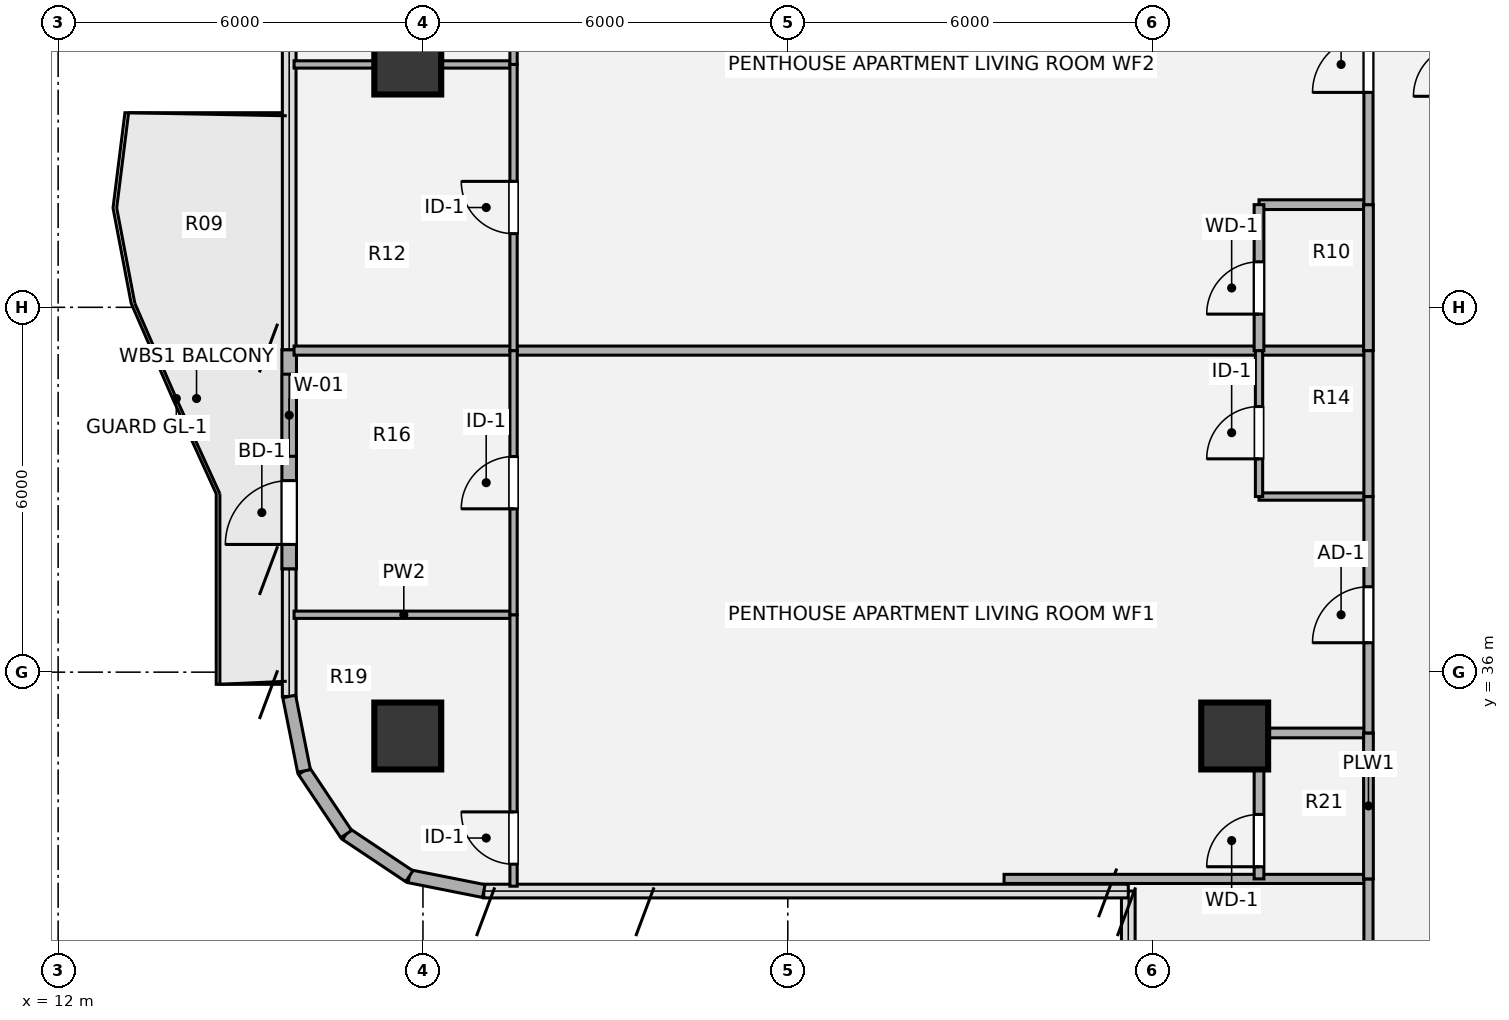
"""IFC4 building model, lengths in metres.
Left out: names, types, materials, properties, quantities, classifications, styles, units other than length and angle.
Written with IfcOpenShell. Run it as: python <this file> out.ifc"""

import sys

from ifc_helpers import new_model, si_unit, direction, frame, frame_2d, origin, origin_2d, place, context, subcontext, project, spatial, rectangle, hollow_circle, extrude, source, transform, mapped, element, fill, save


model = new_model("IFC4")
c1 = context("Model", 3, precision=1e-05, world=origin(), true_north=direction((0.0, 1.0)))
c2 = subcontext(c1, "Body", "Model", "MODEL_VIEW")
j1 = project(units=[si_unit("LENGTHUNIT", "METRE"), si_unit("PLANEANGLEUNIT", "RADIAN")], contexts=[c1])
p1 = place(None, origin())
s1 = spatial("IfcSite", under=j1, at=p1, CompositionType="ELEMENT")
p2 = place(p1, origin())
s2 = spatial("IfcBuilding", under=s1, at=p2, CompositionType="ELEMENT")
p3 = place(p2, frame((0.0, 0.0, 163.98)))
s3 = spatial("IfcBuildingStorey", under=s2, at=p3, CompositionType="ELEMENT", Elevation=163.98)
m1 = source(origin(), c2, "Body", "SweptSolid", [
    extrude(hollow_circle(Radius=0.55, WallThickness=0.04, at=origin_2d()), origin(), (0.0, 0.0, 1.0), 3.78),
])
for number, where, z_axis, x_axis in (
    (1, (17.75, 34.95, 0.0), (0.0, 0.0, 1.0), (1.0, 0.0, 0.0)),
    (2, (17.75, 46.05, 0.0), (0.0, 0.0, 1.0), (1.0, 0.0, 0.0)),
    (3, (31.35, 34.95, 0.0), (0.0, 0.0, 1.0), (1.0, 0.0, 0.0)),
):
    element("IfcColumn", number, at=place(p3, frame(where, z_axis=z_axis, x_axis=x_axis)), inside=s3, PredefinedType="COLUMN", context=c2, shape_type="MappedRepresentation", body=[
        mapped(m1, transform((0.0, 0.0, 0.0), x_axis=(1.0, 0.0, 0.0), y_axis=(0.0, 1.0, 0.0), z_axis=(0.0, 0.0, 1.0), scale=1.0)),
    ])
for number, where, z_axis, x_axis in (
    (4, (19.0, 32.4, 0.0), (0.0, 0.0, 1.0), (-0.981, 0.195, 0.0)),
    (5, (17.775, 32.644, 0.0), (0.0, 0.0, 1.0), (-0.831, 0.556, 0.0)),
    (6, (16.737, 33.337, 0.0), (0.0, 0.0, 1.0), (-0.556, 0.831, 0.0)),
    (7, (16.044, 34.375, 0.0), (0.0, 0.0, 1.0), (-0.195, 0.981, 0.0)),
):
    element("IfcWall", number, at=place(p3, frame(where, z_axis=z_axis, x_axis=x_axis)), inside=s3, PredefinedType="SOLIDWALL", context=c2, shape_type="SweptSolid", body=[
        extrude(rectangle(XDim=1.249, YDim=0.215, at=frame_2d((0.624, 0.0))), origin(), (0.0, 0.0, 1.0), 3.53),
    ])
p4 = place(p3, frame((15.8, 37.7, 0.0), z_axis=(0.0, 0.0, 1.0), x_axis=(0.0, 1.0, 0.0)))
e8 = element("IfcWall", 8, at=p4, inside=s3, PredefinedType="SOLIDWALL", context=c2, shape_type="SweptSolid", body=[
    extrude(rectangle(XDim=3.6, YDim=0.24, at=frame_2d((1.8, 0.0))), origin(), (0.0, 0.0, 1.0), 3.53),
])
p5 = place(p4, frame((0.4, 0.0, 0.0)))
e9 = element("IfcOpeningElement", 9, at=p5, cuts=e8, PredefinedType="OPENING", context=c2, shape_type="SweptSolid", body=[
    extrude(rectangle(XDim=1.05, YDim=2.15, at=origin_2d()), frame((0.525, 0.13, 1.075), z_axis=(0.0, -1.0, 0.0), x_axis=(1.0, 0.0, 0.0)), (0.0, 0.0, 1.0), 0.26),
])
p6 = place(p4, frame((1.85, 0.0, 0.85)))
e10 = element("IfcOpeningElement", 10, at=p6, cuts=e8, PredefinedType="OPENING", context=c2, shape_type="SweptSolid", body=[
    extrude(rectangle(XDim=1.35, YDim=1.35, at=origin_2d()), frame((0.675, 0.13, 0.675), z_axis=(0.0, -1.0, 0.0), x_axis=(1.0, 0.0, 0.0)), (0.0, 0.0, 1.0), 0.26),
])
p7 = place(p3, frame((27.557, 32.6, 0.0), z_axis=(0.0, 0.0, 1.0), x_axis=(1.0, 0.0, 0.0)))
e11 = element("IfcWall", 11, at=p7, inside=s3, PredefinedType="PARTITIONING", context=c2, shape_type="SweptSolid", body=[
    extrude(rectangle(XDim=5.993, YDim=0.15, at=frame_2d((2.997, 0.0))), origin(), (0.0, 0.0, 1.0), 3.5),
])
p8 = place(p3, frame((31.75, 35.0, 0.0), z_axis=(0.0, 0.0, 1.0), x_axis=(1.0, 0.0, 0.0)))
e12 = element("IfcWall", 12, at=p8, inside=s3, PredefinedType="PLUMBINGWALL", context=c2, shape_type="SweptSolid", body=[
    extrude(rectangle(XDim=1.8, YDim=0.16, at=frame_2d((0.9, 0.0))), origin(), (0.0, 0.0, 1.0), 2.903),
])
p9 = place(p3, frame((15.88, 36.944, 0.0), z_axis=(0.0, 0.0, 1.0), x_axis=(1.0, 0.0, 0.0)))
e13 = element("IfcWall", 13, at=p9, inside=s3, PredefinedType="PARTITIONING", context=c2, shape_type="SweptSolid", body=[
    extrude(rectangle(XDim=3.61, YDim=0.12, at=frame_2d((1.805, 0.0))), origin(), (0.0, 0.0, 1.0), 2.982),
])
p10 = place(p3, frame((31.75, 38.888, 0.0), z_axis=(0.0, 0.0, 1.0), x_axis=(1.0, 0.0, 0.0)))
e14 = element("IfcWall", 14, at=p10, inside=s3, PredefinedType="PARTITIONING", context=c2, shape_type="SweptSolid", body=[
    extrude(rectangle(XDim=1.8, YDim=0.12, at=frame_2d((0.9, 0.0))), origin(), (0.0, 0.0, 1.0), 3.259),
])
p11 = place(p3, frame((15.88, 41.288, 0.0), z_axis=(0.0, 0.0, 1.0), x_axis=(1.0, 0.0, 0.0)))
e15 = element("IfcWall", 15, at=p11, inside=s3, PredefinedType="PARTITIONING", context=c2, shape_type="SweptSolid", body=[
    extrude(rectangle(XDim=17.67, YDim=0.15, at=frame_2d((8.835, 0.0))), origin(), (0.0, 0.0, 1.0), 2.982),
])
p12 = place(p3, frame((31.75, 43.688, 0.0), z_axis=(0.0, 0.0, 1.0), x_axis=(1.0, 0.0, 0.0)))
e16 = element("IfcWall", 16, at=p12, inside=s3, PredefinedType="PLUMBINGWALL", context=c2, shape_type="SweptSolid", body=[
    extrude(rectangle(XDim=1.8, YDim=0.16, at=frame_2d((0.9, 0.0))), origin(), (0.0, 0.0, 1.0), 3.259),
])
p13 = place(p3, frame((15.88, 45.994, 0.0), z_axis=(0.0, 0.0, 1.0), x_axis=(1.0, 0.0, 0.0)))
e17 = element("IfcWall", 17, at=p13, inside=s3, PredefinedType="PARTITIONING", context=c2, shape_type="SweptSolid", body=[
    extrude(rectangle(XDim=3.61, YDim=0.12, at=frame_2d((1.805, 0.0))), origin(), (0.0, 0.0, 1.0), 2.903),
])
p14 = place(p3, frame((19.49, 32.48, 0.0), z_axis=(0.0, 0.0, 1.0), x_axis=(0.0, 1.0, 0.0)))
e18 = element("IfcWall", 18, at=p14, inside=s3, PredefinedType="PARTITIONING", context=c2, shape_type="SweptSolid", body=[
    extrude(rectangle(XDim=4.464, YDim=0.12, at=frame_2d((2.232, 0.0))), origin(), (0.0, 0.0, 1.0), 3.5),
])
p15 = place(p14, frame((0.362, 0.0, 0.0)))
e19 = element("IfcOpeningElement", 19, at=p15, cuts=e18, PredefinedType="OPENING", context=c2, shape_type="SweptSolid", body=[
    extrude(rectangle(XDim=0.86, YDim=2.1, at=origin_2d()), frame((0.43, 0.07, 1.05), z_axis=(0.0, -1.0, 0.0), x_axis=(1.0, 0.0, 0.0)), (0.0, 0.0, 1.0), 0.14),
])
p16 = place(p3, frame((19.49, 36.944, 0.0), z_axis=(0.0, 0.0, 1.0), x_axis=(0.0, 1.0, 0.0)))
e20 = element("IfcWall", 20, at=p16, inside=s3, PredefinedType="PARTITIONING", context=c2, shape_type="SweptSolid", body=[
    extrude(rectangle(XDim=4.344, YDim=0.12, at=frame_2d((2.172, 0.0))), origin(), (0.0, 0.0, 1.0), 3.5),
])
p17 = place(p16, frame((1.742, 0.0, 0.0)))
e21 = element("IfcOpeningElement", 21, at=p17, cuts=e20, PredefinedType="OPENING", context=c2, shape_type="SweptSolid", body=[
    extrude(rectangle(XDim=0.86, YDim=2.1, at=origin_2d()), frame((0.43, 0.07, 1.05), z_axis=(0.0, -1.0, 0.0), x_axis=(1.0, 0.0, 0.0)), (0.0, 0.0, 1.0), 0.14),
])
p18 = place(p3, frame((19.49, 41.288, 0.0), z_axis=(0.0, 0.0, 1.0), x_axis=(0.0, 1.0, 0.0)))
e22 = element("IfcWall", 22, at=p18, inside=s3, PredefinedType="PARTITIONING", context=c2, shape_type="SweptSolid", body=[
    extrude(rectangle(XDim=4.706, YDim=0.12, at=frame_2d((2.353, 0.0))), origin(), (0.0, 0.0, 1.0), 3.5),
])
p19 = place(p18, frame((1.923, 0.0, 0.0)))
e23 = element("IfcOpeningElement", 23, at=p19, cuts=e22, PredefinedType="OPENING", context=c2, shape_type="SweptSolid", body=[
    extrude(rectangle(XDim=0.86, YDim=2.1, at=origin_2d()), frame((0.43, 0.07, 1.05), z_axis=(0.0, -1.0, 0.0), x_axis=(1.0, 0.0, 0.0)), (0.0, 0.0, 1.0), 0.14),
])
p20 = place(p3, frame((19.49, 45.994, 0.0), z_axis=(0.0, 0.0, 1.0), x_axis=(0.0, 1.0, 0.0)))
e24 = element("IfcWall", 24, at=p20, inside=s3, PredefinedType="PARTITIONING", context=c2, shape_type="SweptSolid", body=[
    extrude(rectangle(XDim=4.706, YDim=0.12, at=frame_2d((2.353, 0.0))), origin(), (0.0, 0.0, 1.0), 3.5),
])
p21 = place(p20, frame((1.923, 0.0, 0.0)))
e25 = element("IfcOpeningElement", 25, at=p21, cuts=e24, PredefinedType="OPENING", context=c2, shape_type="SweptSolid", body=[
    extrude(rectangle(XDim=0.86, YDim=2.1, at=origin_2d()), frame((0.43, 0.07, 1.05), z_axis=(0.0, -1.0, 0.0), x_axis=(1.0, 0.0, 0.0)), (0.0, 0.0, 1.0), 0.14),
])
p22 = place(p3, frame((31.75, 32.6, 0.0), z_axis=(0.0, 0.0, 1.0), x_axis=(0.0, 1.0, 0.0)))
e26 = element("IfcWall", 26, at=p22, inside=s3, PredefinedType="PLUMBINGWALL", context=c2, shape_type="SweptSolid", body=[
    extrude(rectangle(XDim=2.4, YDim=0.16, at=frame_2d((1.2, 0.0))), origin(), (0.0, 0.0, 1.0), 3.5),
])
p23 = place(p22, frame((0.2, 0.0, 0.0)))
e27 = element("IfcOpeningElement", 27, at=p23, cuts=e26, PredefinedType="OPENING", context=c2, shape_type="SweptSolid", body=[
    extrude(rectangle(XDim=0.86, YDim=2.1, at=origin_2d()), frame((0.43, 0.09, 1.05), z_axis=(0.0, -1.0, 0.0), x_axis=(1.0, 0.0, 0.0)), (0.0, 0.0, 1.0), 0.18),
])
p24 = place(p3, frame((31.75, 38.888, 0.0), z_axis=(0.0, 0.0, 1.0), x_axis=(0.0, 1.0, 0.0)))
e28 = element("IfcWall", 28, at=p24, inside=s3, PredefinedType="PARTITIONING", context=c2, shape_type="SweptSolid", body=[
    extrude(rectangle(XDim=2.4, YDim=0.12, at=frame_2d((1.2, 0.0))), origin(), (0.0, 0.0, 1.0), 3.5),
])
p25 = place(p24, frame((0.62, 0.0, 0.0)))
e29 = element("IfcOpeningElement", 29, at=p25, cuts=e28, PredefinedType="OPENING", context=c2, shape_type="SweptSolid", body=[
    extrude(rectangle(XDim=0.86, YDim=2.1, at=origin_2d()), frame((0.43, 0.07, 1.05), z_axis=(0.0, -1.0, 0.0), x_axis=(1.0, 0.0, 0.0)), (0.0, 0.0, 1.0), 0.14),
])
p26 = place(p3, frame((31.75, 41.288, 0.0), z_axis=(0.0, 0.0, 1.0), x_axis=(0.0, 1.0, 0.0)))
e30 = element("IfcWall", 30, at=p26, inside=s3, PredefinedType="PLUMBINGWALL", context=c2, shape_type="SweptSolid", body=[
    extrude(rectangle(XDim=2.4, YDim=0.16, at=frame_2d((1.2, 0.0))), origin(), (0.0, 0.0, 1.0), 3.5),
])
p27 = place(p26, frame((0.6, 0.0, 0.0)))
e31 = element("IfcOpeningElement", 31, at=p27, cuts=e30, PredefinedType="OPENING", context=c2, shape_type="SweptSolid", body=[
    extrude(rectangle(XDim=0.86, YDim=2.1, at=origin_2d()), frame((0.43, 0.09, 1.05), z_axis=(0.0, -1.0, 0.0), x_axis=(1.0, 0.0, 0.0)), (0.0, 0.0, 1.0), 0.18),
])
p28 = place(p3, frame((33.55, 21.2, 0.0), z_axis=(0.0, 0.0, 1.0), x_axis=(0.0, 1.0, 0.0)))
e32 = element("IfcWall", 32, at=p28, inside=s3, PredefinedType="PARTITIONING", context=c2, shape_type="SweptSolid", body=[
    extrude(rectangle(XDim=11.4, YDim=0.15, at=frame_2d((5.7, 0.0))), origin(), (0.0, 0.0, 1.0), 3.5),
])
p29 = place(p28, frame((5.14, 0.0, 0.0)))
e33 = element("IfcOpeningElement", 33, at=p29, cuts=e32, PredefinedType="OPENING", context=c2, shape_type="SweptSolid", body=[
    extrude(rectangle(XDim=0.86, YDim=2.1, at=origin_2d()), frame((0.43, 0.085, 1.05), z_axis=(0.0, -1.0, 0.0), x_axis=(1.0, 0.0, 0.0)), (0.0, 0.0, 1.0), 0.17),
])
p30 = place(p3, frame((33.55, 32.6, 0.0), z_axis=(0.0, 0.0, 1.0), x_axis=(0.0, 1.0, 0.0)))
e34 = element("IfcWall", 34, at=p30, inside=s3, PredefinedType="PLUMBINGWALL", context=c2, shape_type="SweptSolid", body=[
    extrude(rectangle(XDim=2.4, YDim=0.16, at=frame_2d((1.2, 0.0))), origin(), (0.0, 0.0, 1.0), 3.5),
])
p31 = place(p3, frame((33.55, 35.0, 0.0), z_axis=(0.0, 0.0, 1.0), x_axis=(0.0, 1.0, 0.0)))
e35 = element("IfcWall", 35, at=p31, inside=s3, PredefinedType="PARTITIONING", context=c2, shape_type="SweptSolid", body=[
    extrude(rectangle(XDim=3.888, YDim=0.15, at=frame_2d((1.944, 0.0))), origin(), (0.0, 0.0, 1.0), 3.5),
])
p32 = place(p31, frame((1.484, 0.0, 0.0)))
e36 = element("IfcOpeningElement", 36, at=p32, cuts=e35, PredefinedType="OPENING", context=c2, shape_type="SweptSolid", body=[
    extrude(rectangle(XDim=0.92, YDim=2.1, at=origin_2d()), frame((0.46, 0.085, 1.05), z_axis=(0.0, -1.0, 0.0), x_axis=(1.0, 0.0, 0.0)), (0.0, 0.0, 1.0), 0.17),
])
p33 = place(p3, frame((33.55, 38.888, 0.0), z_axis=(0.0, 0.0, 1.0), x_axis=(0.0, 1.0, 0.0)))
e37 = element("IfcWall", 37, at=p33, inside=s3, PredefinedType="PARTITIONING", context=c2, shape_type="SweptSolid", body=[
    extrude(rectangle(XDim=2.4, YDim=0.15, at=frame_2d((1.2, 0.0))), origin(), (0.0, 0.0, 1.0), 3.5),
])
p34 = place(p3, frame((33.55, 41.288, 0.0), z_axis=(0.0, 0.0, 1.0), x_axis=(0.0, 1.0, 0.0)))
e38 = element("IfcWall", 38, at=p34, inside=s3, PredefinedType="PLUMBINGWALL", context=c2, shape_type="SweptSolid", body=[
    extrude(rectangle(XDim=2.4, YDim=0.16, at=frame_2d((1.2, 0.0))), origin(), (0.0, 0.0, 1.0), 3.5),
])
p35 = place(p3, frame((33.55, 43.688, 0.0), z_axis=(0.0, 0.0, 1.0), x_axis=(0.0, 1.0, 0.0)))
e39 = element("IfcWall", 39, at=p35, inside=s3, PredefinedType="PARTITIONING", context=c2, shape_type="SweptSolid", body=[
    extrude(rectangle(XDim=4.612, YDim=0.15, at=frame_2d((2.306, 0.0))), origin(), (0.0, 0.0, 1.0), 3.5),
])
p36 = place(p35, frame((1.846, 0.0, 0.0)))
e40 = element("IfcOpeningElement", 40, at=p36, cuts=e39, PredefinedType="OPENING", context=c2, shape_type="SweptSolid", body=[
    extrude(rectangle(XDim=0.92, YDim=2.1, at=origin_2d()), frame((0.46, 0.085, 1.05), z_axis=(0.0, -1.0, 0.0), x_axis=(1.0, 0.0, 0.0)), (0.0, 0.0, 1.0), 0.17),
])
m2 = source(origin(), c2, "Body", "SweptSolid", [
    extrude(rectangle(XDim=1.05, YDim=2.15, at=origin_2d()), frame((0.525, 0.025, 1.075), z_axis=(0.0, -1.0, 0.0), x_axis=(1.0, 0.0, 0.0)), (0.0, 0.0, 1.0), 0.05),
])
p37 = place(p5, origin())
e41 = element("IfcDoor", 41, at=p37, inside=s3, OperationType="SINGLE_SWING_LEFT", PredefinedType="DOOR", context=c2, shape_type="MappedRepresentation", body=[
    mapped(m2, transform((0.0, 0.0, 0.0), x_axis=(1.0, 0.0, 0.0), y_axis=(0.0, 1.0, 0.0), z_axis=(0.0, 0.0, 1.0), scale=1.0)),
])
fill(e9, e41)
m3 = source(origin(), c2, "Body", "SweptSolid", [
    extrude(rectangle(XDim=1.35, YDim=1.35, at=origin_2d()), frame((0.675, 0.03, 0.675), z_axis=(0.0, -1.0, 0.0), x_axis=(1.0, 0.0, 0.0)), (0.0, 0.0, 1.0), 0.06),
])
p38 = place(p6, origin())
e42 = element("IfcWindow", 42, at=p38, inside=s3, PartitioningType="SINGLE_PANEL", PredefinedType="WINDOW", context=c2, shape_type="MappedRepresentation", body=[
    mapped(m3, transform((0.0, 0.0, 0.0), x_axis=(1.0, 0.0, 0.0), y_axis=(0.0, 1.0, 0.0), z_axis=(0.0, 0.0, 1.0), scale=1.0)),
])
fill(e10, e42)
m4 = source(origin(), c2, "Body", "SweptSolid", [
    extrude(rectangle(XDim=0.86, YDim=2.1, at=origin_2d()), frame((0.43, 0.025, 1.05), z_axis=(0.0, -1.0, 0.0), x_axis=(1.0, 0.0, 0.0)), (0.0, 0.0, 1.0), 0.05),
])
p39 = place(p15, origin())
e43 = element("IfcDoor", 43, at=p39, inside=s3, OperationType="SINGLE_SWING_RIGHT", PredefinedType="DOOR", context=c2, shape_type="MappedRepresentation", body=[
    mapped(m4, transform((0.0, 0.0, 0.0), x_axis=(1.0, 0.0, 0.0), y_axis=(0.0, 1.0, 0.0), z_axis=(0.0, 0.0, 1.0), scale=1.0)),
])
fill(e19, e43)
p40 = place(p17, origin())
e44 = element("IfcDoor", 44, at=p40, inside=s3, OperationType="SINGLE_SWING_LEFT", PredefinedType="DOOR", context=c2, shape_type="MappedRepresentation", body=[
    mapped(m4, transform((0.0, 0.0, 0.0), x_axis=(1.0, 0.0, 0.0), y_axis=(0.0, 1.0, 0.0), z_axis=(0.0, 0.0, 1.0), scale=1.0)),
])
fill(e21, e44)
p41 = place(p19, origin())
e45 = element("IfcDoor", 45, at=p41, inside=s3, OperationType="SINGLE_SWING_RIGHT", PredefinedType="DOOR", context=c2, shape_type="MappedRepresentation", body=[
    mapped(m4, transform((0.0, 0.0, 0.0), x_axis=(1.0, 0.0, 0.0), y_axis=(0.0, 1.0, 0.0), z_axis=(0.0, 0.0, 1.0), scale=1.0)),
])
fill(e23, e45)
m5 = source(origin(), c2, "Body", "SweptSolid", [
    extrude(rectangle(XDim=0.86, YDim=2.1, at=origin_2d()), frame((0.43, 0.025, 1.05), z_axis=(0.0, -1.0, 0.0), x_axis=(1.0, 0.0, 0.0)), (0.0, 0.0, 1.0), 0.05),
])
p42 = place(p23, origin())
e46 = element("IfcDoor", 46, at=p42, inside=s3, OperationType="SINGLE_SWING_LEFT", PredefinedType="DOOR", context=c2, shape_type="MappedRepresentation", body=[
    mapped(m5, transform((0.0, 0.0, 0.0), x_axis=(1.0, 0.0, 0.0), y_axis=(0.0, 1.0, 0.0), z_axis=(0.0, 0.0, 1.0), scale=1.0)),
])
fill(e27, e46)
p43 = place(p25, origin())
e47 = element("IfcDoor", 47, at=p43, inside=s3, OperationType="SINGLE_SWING_LEFT", PredefinedType="DOOR", context=c2, shape_type="MappedRepresentation", body=[
    mapped(m4, transform((0.0, 0.0, 0.0), x_axis=(1.0, 0.0, 0.0), y_axis=(0.0, 1.0, 0.0), z_axis=(0.0, 0.0, 1.0), scale=1.0)),
])
fill(e29, e47)
p44 = place(p27, origin())
e48 = element("IfcDoor", 48, at=p44, inside=s3, OperationType="SINGLE_SWING_LEFT", PredefinedType="DOOR", context=c2, shape_type="MappedRepresentation", body=[
    mapped(m5, transform((0.0, 0.0, 0.0), x_axis=(1.0, 0.0, 0.0), y_axis=(0.0, 1.0, 0.0), z_axis=(0.0, 0.0, 1.0), scale=1.0)),
])
fill(e31, e48)
m6 = source(origin(), c2, "Body", "SweptSolid", [
    extrude(rectangle(XDim=0.92, YDim=2.1, at=origin_2d()), frame((0.46, 0.025, 1.05), z_axis=(0.0, -1.0, 0.0), x_axis=(1.0, 0.0, 0.0)), (0.0, 0.0, 1.0), 0.05),
])
p45 = place(p32, origin())
e49 = element("IfcDoor", 49, at=p45, inside=s3, OperationType="SINGLE_SWING_LEFT", PredefinedType="DOOR", context=c2, shape_type="MappedRepresentation", body=[
    mapped(m6, transform((0.0, 0.0, 0.0), x_axis=(1.0, 0.0, 0.0), y_axis=(0.0, 1.0, 0.0), z_axis=(0.0, 0.0, 1.0), scale=1.0)),
])
fill(e36, e49)
p46 = place(p36, origin())
e50 = element("IfcDoor", 50, at=p46, inside=s3, OperationType="SINGLE_SWING_LEFT", PredefinedType="DOOR", context=c2, shape_type="MappedRepresentation", body=[
    mapped(m6, transform((0.0, 0.0, 0.0), x_axis=(1.0, 0.0, 0.0), y_axis=(0.0, 1.0, 0.0), z_axis=(0.0, 0.0, 1.0), scale=1.0)),
])
fill(e40, e50)
save(model, sys.argv[1])
